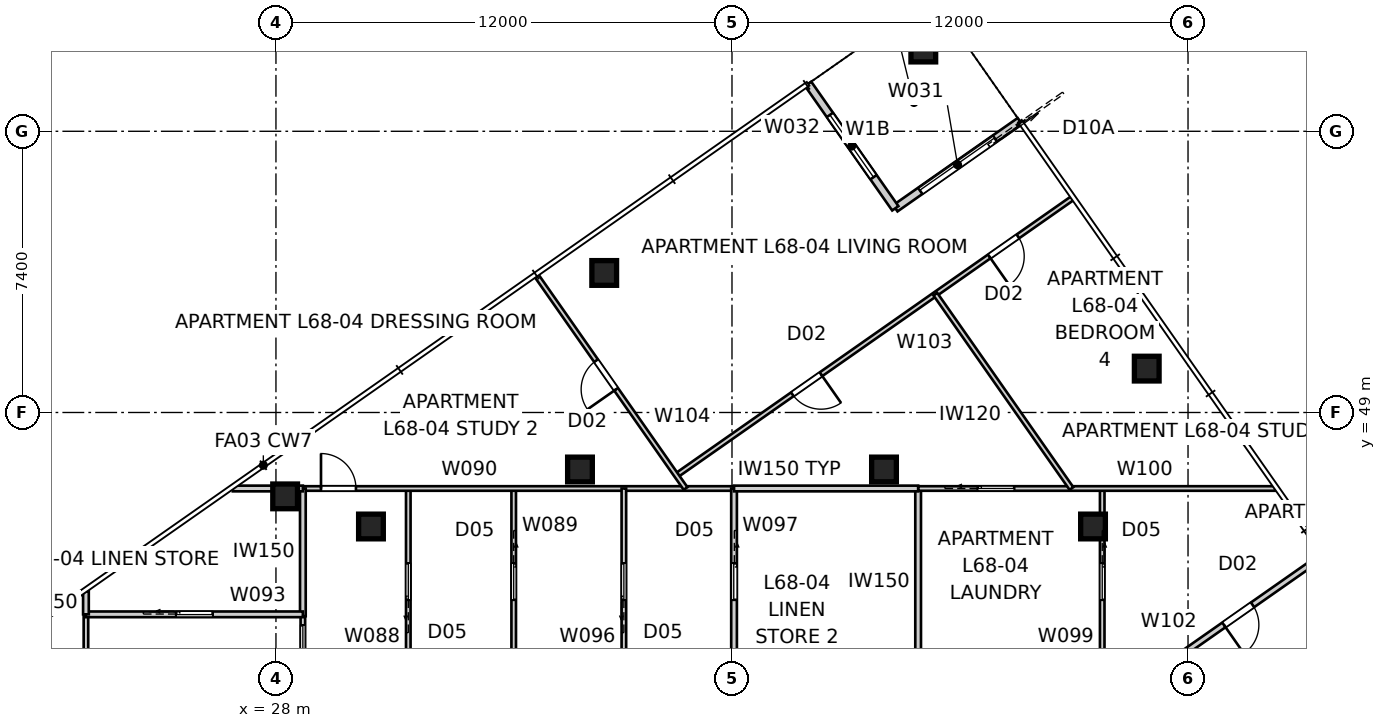
"""IFC4 building model, lengths in metres.
Left out: names, types, materials, properties, quantities, classifications, styles, units other than length and angle.
Written with IfcOpenShell. Run it as: python <this file> out.ifc"""

import sys

from ifc_helpers import new_model, si_unit, direction, frame, frame_2d, origin, origin_2d, place, context, subcontext, project, spatial, rectangle, extrude, element, fill, save


model = new_model("IFC4")
c1 = context("Model", 3, precision=1e-05, world=origin(), true_north=direction((0.0, 1.0)))
c2 = subcontext(c1, "Body", "Model", "MODEL_VIEW")
j1 = project(units=[si_unit("LENGTHUNIT", "METRE"), si_unit("PLANEANGLEUNIT", "RADIAN")], contexts=[c1])
p1 = place(None, origin())
s1 = spatial("IfcSite", under=j1, at=p1, CompositionType="ELEMENT")
p2 = place(p1, origin())
s2 = spatial("IfcBuilding", under=s1, at=p2, CompositionType="ELEMENT")
p3 = place(p2, frame((0.0, 0.0, 247.2)))
s3 = spatial("IfcBuildingStorey", under=s2, at=p3, CompositionType="ELEMENT", Elevation=247.2)
for number, where, z_axis, x_axis in (
    (1, (50.914, 50.155, 0.0), (0.0, 0.0, 1.0), (1.0, 0.0, 0.0)),
    (2, (45.034, 58.551, 0.0), (0.0, 0.0, 1.0), (1.0, 0.0, 0.0)),
    (3, (36.638, 52.672, 0.0), (0.0, 0.0, 1.0), (1.0, 0.0, 0.0)),
    (4, (28.242, 46.793, 0.0), (0.0, 0.0, 1.0), (1.0, 0.0, 0.0)),
    (5, (49.5, 46.0, 0.0), (0.0, 0.0, 1.0), (1.0, 0.0, 0.0)),
    (6, (44.0, 47.5, 0.0), (0.0, 0.0, 1.0), (1.0, 0.0, 0.0)),
    (7, (36.0, 47.5, 0.0), (0.0, 0.0, 1.0), (1.0, 0.0, 0.0)),
    (8, (30.5, 46.0, 0.0), (0.0, 0.0, 1.0), (1.0, 0.0, 0.0)),
):
    element("IfcColumn", number, at=place(p3, frame(where, z_axis=z_axis, x_axis=x_axis)), inside=s3, PredefinedType="COLUMN", context=c2, shape_type="SweptSolid", body=[
        extrude(rectangle(XDim=0.65, YDim=0.65, at=origin_2d()), origin(), (0.0, 0.0, 1.0), 3.4),
    ])
p4 = place(p3, frame((47.574, 56.667, 0.0), z_axis=(0.0, 0.0, 1.0), x_axis=(-0.819165963305, -0.573556557423, 0.0)))
e9 = element("IfcWall", 9, at=p4, inside=s3, PredefinedType="SOLIDWALL", context=c2, shape_type="SweptSolid", body=[
    extrude(rectangle(XDim=4.0, YDim=0.2, at=frame_2d((2.0, 0.0))), origin(), (0.0, 0.0, 1.0), 3.25),
])
p5 = place(p4, frame((0.8, 0.0, 0.0)))
e10 = element("IfcOpeningElement", 10, at=p5, cuts=e9, PredefinedType="OPENING", context=c2, shape_type="SweptSolid", body=[
    extrude(rectangle(XDim=2.4, YDim=2.1, at=frame_2d((1.2, 1.05))), frame((0.0, 0.11, 0.0), z_axis=(0.0, -1.0, 0.0), x_axis=(1.0, 0.0, 0.0)), (0.0, 0.0, 1.0), 0.22),
])
p6 = place(p3, frame((44.298, 54.373, 0.0), z_axis=(0.0, 0.0, 1.0), x_axis=(-0.573597512525, 0.819137286189, 0.0)))
e11 = element("IfcWall", 11, at=p6, inside=s3, PredefinedType="SOLIDWALL", context=c2, shape_type="SweptSolid", body=[
    extrude(rectangle(XDim=4.0, YDim=0.2, at=frame_2d((2.0, 0.0))), origin(), (0.0, 0.0, 1.0), 3.25),
])
p7 = place(p6, frame((1.0, 0.0, 0.45)))
e12 = element("IfcOpeningElement", 12, at=p7, cuts=e11, PredefinedType="OPENING", context=c2, shape_type="SweptSolid", body=[
    extrude(rectangle(XDim=2.0, YDim=1.8, at=frame_2d((1.0, 0.9))), frame((0.0, 0.11, 0.0), z_axis=(0.0, -1.0, 0.0), x_axis=(1.0, 0.0, 0.0)), (0.0, 0.0, 1.0), 0.22),
])
p8 = place(p3, frame((23.0, 16.864, 0.0), z_axis=(0.0, 0.0, 1.0), x_axis=(0.0, 1.0, 0.0)))
e13 = element("IfcWall", 13, at=p8, inside=s3, PredefinedType="PARTITIONING", context=c2, shape_type="SweptSolid", body=[
    extrude(rectangle(XDim=26.824, YDim=0.12, at=frame_2d((13.412, 0.0))), origin(), (0.0, 0.0, 1.0), 2.55),
])
p9 = place(p8, frame((9.599, 0.0, 0.0)))
e14 = element("IfcOpeningElement", 14, at=p9, cuts=e13, PredefinedType="OPENING", context=c2, shape_type="SweptSolid", body=[
    extrude(rectangle(XDim=0.92, YDim=2.34, at=frame_2d((0.46, 1.17))), frame((0.0, 0.07, 0.0), z_axis=(0.0, -1.0, 0.0), x_axis=(1.0, 0.0, 0.0)), (0.0, 0.0, 1.0), 0.14),
])
p10 = place(p8, frame((17.603, 0.0, 0.0)))
e15 = element("IfcOpeningElement", 15, at=p10, cuts=e13, PredefinedType="OPENING", context=c2, shape_type="SweptSolid", body=[
    extrude(rectangle(XDim=0.92, YDim=2.34, at=frame_2d((0.46, 1.17))), frame((0.0, 0.07, 0.0), z_axis=(0.0, -1.0, 0.0), x_axis=(1.0, 0.0, 0.0)), (0.0, 0.0, 1.0), 0.14),
])
p11 = place(p8, frame((12.806, 0.0, 0.0)))
e16 = element("IfcOpeningElement", 16, at=p11, cuts=e13, PredefinedType="OPENING", context=c2, shape_type="SweptSolid", body=[
    extrude(rectangle(XDim=0.92, YDim=2.34, at=frame_2d((0.46, 1.17))), frame((0.0, 0.07, 0.0), z_axis=(0.0, -1.0, 0.0), x_axis=(1.0, 0.0, 0.0)), (0.0, 0.0, 1.0), 0.14),
])
p12 = place(p3, frame((31.482, 42.1, 0.0), z_axis=(0.0, 0.0, 1.0), x_axis=(0.0, 1.0, 0.0)))
e17 = element("IfcWall", 17, at=p12, inside=s3, PredefinedType="PARTITIONING", context=c2, shape_type="SweptSolid", body=[
    extrude(rectangle(XDim=4.9, YDim=0.12, at=frame_2d((2.45, 0.0))), origin(), (0.0, 0.0, 1.0), 3.25),
])
p13 = place(p12, frame((1.97, 0.0, 0.0)))
e18 = element("IfcOpeningElement", 18, at=p13, cuts=e17, PredefinedType="OPENING", context=c2, shape_type="SweptSolid", body=[
    extrude(rectangle(XDim=0.96, YDim=2.1, at=frame_2d((0.48, 1.05))), frame((0.0, 0.07, 0.0), z_axis=(0.0, -1.0, 0.0), x_axis=(1.0, 0.0, 0.0)), (0.0, 0.0, 1.0), 0.14),
])
p14 = place(p3, frame((34.256, 47.0, 0.0), z_axis=(0.0, 0.0, 1.0), x_axis=(0.0, -1.0, 0.0)))
e19 = element("IfcWall", 19, at=p14, inside=s3, PredefinedType="PARTITIONING", context=c2, shape_type="SweptSolid", body=[
    extrude(rectangle(XDim=4.9, YDim=0.12, at=frame_2d((2.45, 0.0))), origin(), (0.0, 0.0, 1.0), 2.796),
])
p15 = place(p14, frame((1.97, 0.0, 0.0)))
e20 = element("IfcOpeningElement", 20, at=p15, cuts=e19, PredefinedType="OPENING", context=c2, shape_type="SweptSolid", body=[
    extrude(rectangle(XDim=0.96, YDim=2.1, at=frame_2d((0.48, 1.05))), frame((0.0, 0.07, 0.0), z_axis=(0.0, -1.0, 0.0), x_axis=(1.0, 0.0, 0.0)), (0.0, 0.0, 1.0), 0.14),
])
p16 = place(p3, frame((28.708, 47.0, 0.0), z_axis=(0.0, 0.0, 1.0), x_axis=(1.0, 0.0, 0.0)))
e21 = element("IfcWall", 21, at=p16, inside=s3, PredefinedType="PARTITIONING", context=c2, shape_type="SweptSolid", body=[
    extrude(rectangle(XDim=11.346, YDim=0.12, at=frame_2d((5.673, 0.0))), origin(), (0.0, 0.0, 1.0), 2.55),
])
p17 = place(p16, frame((0.477, 0.0, 0.0)))
e22 = element("IfcOpeningElement", 22, at=p17, cuts=e21, PredefinedType="OPENING", context=c2, shape_type="SweptSolid", body=[
    extrude(rectangle(XDim=0.92, YDim=2.34, at=frame_2d((0.46, 1.17))), frame((0.0, 0.07, 0.0), z_axis=(0.0, -1.0, 0.0), x_axis=(1.0, 0.0, 0.0)), (0.0, 0.0, 1.0), 0.14),
])
p18 = place(p3, frame((28.708, 41.18, 0.0), z_axis=(0.0, 0.0, 1.0), x_axis=(0.0, 1.0, 0.0)))
e23 = element("IfcWall", 23, at=p18, inside=s3, PredefinedType="PARTITIONING", context=c2, shape_type="SweptSolid", body=[
    extrude(rectangle(XDim=2.458, YDim=0.12, at=frame_2d((1.229, 0.0))), origin(), (0.0, 0.0, 1.0), 3.25),
])
p19 = place(p18, frame((1.259, 0.0, 0.0)))
e24 = element("IfcOpeningElement", 24, at=p19, cuts=e23, PredefinedType="OPENING", context=c2, shape_type="SweptSolid", body=[
    extrude(rectangle(XDim=0.96, YDim=2.1, at=frame_2d((0.48, 1.05))), frame((0.0, 0.07, 0.0), z_axis=(0.0, -1.0, 0.0), x_axis=(1.0, 0.0, 0.0)), (0.0, 0.0, 1.0), 0.14),
])
p20 = place(p3, frame((28.708, 43.638, 0.0), z_axis=(0.0, 0.0, 1.0), x_axis=(0.0, 1.0, 0.0)))
e25 = element("IfcWall", 25, at=p20, inside=s3, PredefinedType="SOLIDWALL", context=c2, shape_type="SweptSolid", body=[
    extrude(rectangle(XDim=3.362, YDim=0.15, at=frame_2d((1.681, 0.0))), origin(), (0.0, 0.0, 1.0), 3.25),
])
p21 = place(p3, frame((23.0, 43.688, 0.0), z_axis=(0.0, 0.0, 1.0), x_axis=(1.0, 0.0, 0.0)))
e26 = element("IfcWall", 26, at=p21, inside=s3, PredefinedType="SOLIDWALL", context=c2, shape_type="SweptSolid", body=[
    extrude(rectangle(XDim=5.708, YDim=0.15, at=frame_2d((2.854, 0.0))), origin(), (0.0, 0.0, 1.0), 3.25),
])
p22 = place(p21, frame((2.374, 0.0, 0.0)))
e27 = element("IfcOpeningElement", 27, at=p22, cuts=e26, PredefinedType="OPENING", context=c2, shape_type="SweptSolid", body=[
    extrude(rectangle(XDim=0.96, YDim=2.1, at=frame_2d((0.48, 1.05))), frame((0.0, 0.085, 0.0), z_axis=(0.0, -1.0, 0.0), x_axis=(1.0, 0.0, 0.0)), (0.0, 0.0, 1.0), 0.17),
])
p23 = place(p3, frame((23.0, 43.688, 0.0), z_axis=(0.0, 0.0, 1.0), x_axis=(0.0, 1.0, 0.0)))
e28 = element("IfcWall", 28, at=p23, inside=s3, PredefinedType="SOLIDWALL", context=c2, shape_type="SweptSolid", body=[
    extrude(rectangle(XDim=0.606, YDim=0.15, at=frame_2d((0.303, 0.0))), origin(), (0.0, 0.0, 1.0), 3.25),
])
p24 = place(p3, frame((26.864, 47.0, 0.0), z_axis=(0.0, 0.0, 1.0), x_axis=(1.0, 0.0, 0.0)))
e29 = element("IfcWall", 29, at=p24, inside=s3, PredefinedType="SOLIDWALL", context=c2, shape_type="SweptSolid", body=[
    extrude(rectangle(XDim=1.844, YDim=0.15, at=frame_2d((0.922, 0.0))), origin(), (0.0, 0.0, 1.0), 3.25),
])
p25 = place(p3, frame((37.155, 42.1, 0.0), z_axis=(0.0, 0.0, 1.0), x_axis=(0.0, 1.0, 0.0)))
e30 = element("IfcWall", 30, at=p25, inside=s3, PredefinedType="PARTITIONING", context=c2, shape_type="SweptSolid", body=[
    extrude(rectangle(XDim=4.9, YDim=0.12, at=frame_2d((2.45, 0.0))), origin(), (0.0, 0.0, 1.0), 2.796),
])
p26 = place(p25, frame((1.97, 0.0, 0.0)))
e31 = element("IfcOpeningElement", 31, at=p26, cuts=e30, PredefinedType="OPENING", context=c2, shape_type="SweptSolid", body=[
    extrude(rectangle(XDim=0.96, YDim=2.1, at=frame_2d((0.48, 1.05))), frame((0.0, 0.07, 0.0), z_axis=(0.0, -1.0, 0.0), x_axis=(1.0, 0.0, 0.0)), (0.0, 0.0, 1.0), 0.14),
])
p27 = place(p3, frame((40.054, 47.0, 0.0), z_axis=(0.0, 0.0, 1.0), x_axis=(0.0, -1.0, 0.0)))
e32 = element("IfcWall", 32, at=p27, inside=s3, PredefinedType="SOLIDWALL", context=c2, shape_type="SweptSolid", body=[
    extrude(rectangle(XDim=4.9, YDim=0.15, at=frame_2d((2.45, 0.0))), origin(), (0.0, 0.0, 1.0), 2.796),
])
p28 = place(p27, frame((1.97, 0.0, 0.0)))
e33 = element("IfcOpeningElement", 33, at=p28, cuts=e32, PredefinedType="OPENING", context=c2, shape_type="SweptSolid", body=[
    extrude(rectangle(XDim=0.96, YDim=2.1, at=frame_2d((0.48, 1.05))), frame((0.0, 0.085, 0.0), z_axis=(0.0, -1.0, 0.0), x_axis=(1.0, 0.0, 0.0)), (0.0, 0.0, 1.0), 0.17),
])
p29 = place(p3, frame((44.898, 42.1, 0.0), z_axis=(0.0, 0.0, 1.0), x_axis=(0.0, 1.0, 0.0)))
e34 = element("IfcWall", 34, at=p29, inside=s3, PredefinedType="SOLIDWALL", context=c2, shape_type="SweptSolid", body=[
    extrude(rectangle(XDim=4.9, YDim=0.15, at=frame_2d((2.45, 0.0))), origin(), (0.0, 0.0, 1.0), 3.25),
])
p30 = place(p3, frame((49.742, 47.0, 0.0), z_axis=(0.0, 0.0, 1.0), x_axis=(0.0, -1.0, 0.0)))
e35 = element("IfcWall", 35, at=p30, inside=s3, PredefinedType="PARTITIONING", context=c2, shape_type="SweptSolid", body=[
    extrude(rectangle(XDim=4.9, YDim=0.12, at=frame_2d((2.45, 0.0))), origin(), (0.0, 0.0, 1.0), 3.25),
])
p31 = place(p30, frame((1.97, 0.0, 0.0)))
e36 = element("IfcOpeningElement", 36, at=p31, cuts=e35, PredefinedType="OPENING", context=c2, shape_type="SweptSolid", body=[
    extrude(rectangle(XDim=0.96, YDim=2.1, at=frame_2d((0.48, 1.05))), frame((0.0, 0.07, 0.0), z_axis=(0.0, -1.0, 0.0), x_axis=(1.0, 0.0, 0.0)), (0.0, 0.0, 1.0), 0.14),
])
p32 = place(p3, frame((44.898, 47.0, 0.0), z_axis=(0.0, 0.0, 1.0), x_axis=(1.0, 0.0, 0.0)))
e37 = element("IfcWall", 37, at=p32, inside=s3, PredefinedType="PARTITIONING", context=c2, shape_type="SweptSolid", body=[
    extrude(rectangle(XDim=9.396, YDim=0.12, at=frame_2d((4.698, 0.0))), origin(), (0.0, 0.0, 1.0), 2.55),
])
p33 = place(p32, frame((1.568, 0.0, 0.0)))
e38 = element("IfcOpeningElement", 38, at=p33, cuts=e37, PredefinedType="OPENING", context=c2, shape_type="SweptSolid", body=[
    extrude(rectangle(XDim=0.96, YDim=2.1, at=frame_2d((0.48, 1.05))), frame((0.0, 0.07, 0.0), z_axis=(0.0, -1.0, 0.0), x_axis=(1.0, 0.0, 0.0)), (0.0, 0.0, 1.0), 0.14),
])
p34 = place(p3, frame((40.054, 47.0, 0.0), z_axis=(0.0, 0.0, 1.0), x_axis=(1.0, 0.0, 0.0)))
e39 = element("IfcWall", 39, at=p34, inside=s3, PredefinedType="SOLIDWALL", context=c2, shape_type="SweptSolid", body=[
    extrude(rectangle(XDim=4.844, YDim=0.15, at=frame_2d((2.422, 0.0))), origin(), (0.0, 0.0, 1.0), 3.25),
])
p35 = place(p3, frame((55.537, 45.226, 0.0), z_axis=(0.0, 0.0, 1.0), x_axis=(-0.819158250207, -0.573567573279, 0.0)))
e40 = element("IfcWall", 40, at=p35, inside=s3, PredefinedType="SOLIDWALL", context=c2, shape_type="SweptSolid", body=[
    extrude(rectangle(XDim=5.45, YDim=0.15, at=frame_2d((2.725, 0.0))), origin(), (0.0, 0.0, 1.0), 3.25),
])
p36 = place(p35, frame((2.245, 0.0, 0.0)))
e41 = element("IfcOpeningElement", 41, at=p36, cuts=e40, PredefinedType="OPENING", context=c2, shape_type="SweptSolid", body=[
    extrude(rectangle(XDim=0.92, YDim=2.34, at=frame_2d((0.46, 1.17))), frame((0.0, 0.085, 0.0), z_axis=(0.0, -1.0, 0.0), x_axis=(1.0, 0.0, 0.0)), (0.0, 0.0, 1.0), 0.17),
])
p37 = place(p3, frame((48.949, 54.633, 0.0), z_axis=(0.0, 0.0, 1.0), x_axis=(-0.819155207289, -0.573571919092, 0.0)))
e42 = element("IfcWall", 42, at=p37, inside=s3, PredefinedType="PARTITIONING", context=c2, shape_type="SweptSolid", body=[
    extrude(rectangle(XDim=12.71, YDim=0.12, at=frame_2d((6.355, 0.0))), origin(), (0.0, 0.0, 1.0), 3.25),
])
p38 = place(p37, frame((8.066, 0.0, 0.0)))
e43 = element("IfcOpeningElement", 43, at=p38, cuts=e42, PredefinedType="OPENING", context=c2, shape_type="SweptSolid", body=[
    extrude(rectangle(XDim=0.92, YDim=2.34, at=frame_2d((0.46, 1.17))), frame((0.0, 0.07, 0.0), z_axis=(0.0, -1.0, 0.0), x_axis=(1.0, 0.0, 0.0)), (0.0, 0.0, 1.0), 0.14),
])
p39 = place(p37, frame((1.741, 0.0, 0.0)))
e44 = element("IfcOpeningElement", 44, at=p39, cuts=e42, PredefinedType="OPENING", context=c2, shape_type="SweptSolid", body=[
    extrude(rectangle(XDim=0.92, YDim=2.34, at=frame_2d((0.46, 1.17))), frame((0.0, 0.07, 0.0), z_axis=(0.0, -1.0, 0.0), x_axis=(1.0, 0.0, 0.0)), (0.0, 0.0, 1.0), 0.14),
])
p40 = place(p3, frame((38.778, 47.0, 0.0), z_axis=(0.0, 0.0, 1.0), x_axis=(-0.57357503053, 0.819153028653, 0.0)))
e45 = element("IfcWall", 45, at=p40, inside=s3, PredefinedType="PARTITIONING", context=c2, shape_type="SweptSolid", body=[
    extrude(rectangle(XDim=6.834, YDim=0.12, at=frame_2d((3.417, 0.0))), origin(), (0.0, 0.0, 1.0), 3.25),
])
p41 = place(p40, frame((3.186, 0.0, 0.0)))
e46 = element("IfcOpeningElement", 46, at=p41, cuts=e45, PredefinedType="OPENING", context=c2, shape_type="SweptSolid", body=[
    extrude(rectangle(XDim=0.92, YDim=2.34, at=frame_2d((0.46, 1.17))), frame((0.0, 0.07, 0.0), z_axis=(0.0, -1.0, 0.0), x_axis=(1.0, 0.0, 0.0)), (0.0, 0.0, 1.0), 0.14),
])
p42 = place(p3, frame((48.932, 47.0, 0.0), z_axis=(0.0, 0.0, 1.0), x_axis=(-0.573569946952, 0.819156588177, 0.0)))
e47 = element("IfcWall", 47, at=p42, inside=s3, PredefinedType="PARTITIONING", context=c2, shape_type="SweptSolid", body=[
    extrude(rectangle(XDim=6.243, YDim=0.12, at=frame_2d((3.122, 0.0))), origin(), (0.0, 0.0, 1.0), 3.25),
])
p43 = place(p5, origin())
e48 = element("IfcDoor", 48, at=p43, inside=s3, OperationType="SLIDING_TO_LEFT", PredefinedType="DOOR", context=c2, shape_type="SweptSolid", body=[
    extrude(rectangle(XDim=2.4, YDim=2.1, at=frame_2d((1.2, 1.05))), frame((0.0, 0.025, 0.0), z_axis=(0.0, -1.0, 0.0), x_axis=(1.0, 0.0, 0.0)), (0.0, 0.0, 1.0), 0.05),
])
fill(e10, e48)
p44 = place(p7, origin())
e49 = element("IfcWindow", 49, at=p44, inside=s3, PartitioningType="SINGLE_PANEL", PredefinedType="WINDOW", context=c2, shape_type="SweptSolid", body=[
    extrude(rectangle(XDim=2.0, YDim=1.8, at=frame_2d((1.0, 0.9))), frame((0.0, 0.03, 0.0), z_axis=(0.0, -1.0, 0.0), x_axis=(1.0, 0.0, 0.0)), (0.0, 0.0, 1.0), 0.06),
])
fill(e12, e49)
p45 = place(p22, origin())
e50 = element("IfcDoor", 50, at=p45, inside=s3, OperationType="SLIDING_TO_LEFT", PredefinedType="DOOR", context=c2, shape_type="SweptSolid", body=[
    extrude(rectangle(XDim=0.96, YDim=2.1, at=frame_2d((0.48, 1.05))), frame((0.0, 0.025, 0.0), z_axis=(0.0, -1.0, 0.0), x_axis=(1.0, 0.0, 0.0)), (0.0, 0.0, 1.0), 0.05),
])
fill(e27, e50)
p46 = place(p19, origin())
e51 = element("IfcDoor", 51, at=p46, inside=s3, OperationType="SLIDING_TO_LEFT", PredefinedType="DOOR", context=c2, shape_type="SweptSolid", body=[
    extrude(rectangle(XDim=0.96, YDim=2.1, at=frame_2d((0.48, 1.05))), frame((0.0, 0.025, 0.0), z_axis=(0.0, -1.0, 0.0), x_axis=(1.0, 0.0, 0.0)), (0.0, 0.0, 1.0), 0.05),
])
fill(e24, e51)
p47 = place(p13, origin())
e52 = element("IfcDoor", 52, at=p47, inside=s3, OperationType="SLIDING_TO_LEFT", PredefinedType="DOOR", context=c2, shape_type="SweptSolid", body=[
    extrude(rectangle(XDim=0.96, YDim=2.1, at=frame_2d((0.48, 1.05))), frame((0.0, 0.025, 0.0), z_axis=(0.0, -1.0, 0.0), x_axis=(1.0, 0.0, 0.0)), (0.0, 0.0, 1.0), 0.05),
])
fill(e18, e52)
p48 = place(p17, origin())
e53 = element("IfcDoor", 53, at=p48, inside=s3, OperationType="SINGLE_SWING_LEFT", PredefinedType="DOOR", context=c2, shape_type="SweptSolid", body=[
    extrude(rectangle(XDim=0.92, YDim=2.34, at=frame_2d((0.46, 1.17))), frame((0.0, 0.025, 0.0), z_axis=(0.0, -1.0, 0.0), x_axis=(1.0, 0.0, 0.0)), (0.0, 0.0, 1.0), 0.05),
])
fill(e22, e53)
p49 = place(p15, origin())
e54 = element("IfcDoor", 54, at=p49, inside=s3, OperationType="SLIDING_TO_LEFT", PredefinedType="DOOR", context=c2, shape_type="SweptSolid", body=[
    extrude(rectangle(XDim=0.96, YDim=2.1, at=frame_2d((0.48, 1.05))), frame((0.0, 0.025, 0.0), z_axis=(0.0, -1.0, 0.0), x_axis=(1.0, 0.0, 0.0)), (0.0, 0.0, 1.0), 0.05),
])
fill(e20, e54)
p50 = place(p41, origin())
e55 = element("IfcDoor", 55, at=p50, inside=s3, OperationType="SINGLE_SWING_LEFT", PredefinedType="DOOR", context=c2, shape_type="SweptSolid", body=[
    extrude(rectangle(XDim=0.92, YDim=2.34, at=frame_2d((0.46, 1.17))), frame((0.0, 0.025, 0.0), z_axis=(0.0, -1.0, 0.0), x_axis=(1.0, 0.0, 0.0)), (0.0, 0.0, 1.0), 0.05),
])
fill(e46, e55)
p51 = place(p26, origin())
e56 = element("IfcDoor", 56, at=p51, inside=s3, OperationType="SLIDING_TO_LEFT", PredefinedType="DOOR", context=c2, shape_type="SweptSolid", body=[
    extrude(rectangle(XDim=0.96, YDim=2.1, at=frame_2d((0.48, 1.05))), frame((0.0, 0.025, 0.0), z_axis=(0.0, -1.0, 0.0), x_axis=(1.0, 0.0, 0.0)), (0.0, 0.0, 1.0), 0.05),
])
fill(e31, e56)
p52 = place(p38, origin())
e57 = element("IfcDoor", 57, at=p52, inside=s3, OperationType="SINGLE_SWING_LEFT", PredefinedType="DOOR", context=c2, shape_type="SweptSolid", body=[
    extrude(rectangle(XDim=0.92, YDim=2.34, at=frame_2d((0.46, 1.17))), frame((0.0, 0.025, 0.0), z_axis=(0.0, -1.0, 0.0), x_axis=(1.0, 0.0, 0.0)), (0.0, 0.0, 1.0), 0.05),
])
fill(e43, e57)
p53 = place(p39, origin())
e58 = element("IfcDoor", 58, at=p53, inside=s3, OperationType="SINGLE_SWING_RIGHT", PredefinedType="DOOR", context=c2, shape_type="SweptSolid", body=[
    extrude(rectangle(XDim=0.92, YDim=2.34, at=frame_2d((0.46, 1.17))), frame((0.0, 0.025, 0.0), z_axis=(0.0, -1.0, 0.0), x_axis=(1.0, 0.0, 0.0)), (0.0, 0.0, 1.0), 0.05),
])
fill(e44, e58)
p54 = place(p28, origin())
e59 = element("IfcDoor", 59, at=p54, inside=s3, OperationType="SLIDING_TO_LEFT", PredefinedType="DOOR", context=c2, shape_type="SweptSolid", body=[
    extrude(rectangle(XDim=0.96, YDim=2.1, at=frame_2d((0.48, 1.05))), frame((0.0, 0.025, 0.0), z_axis=(0.0, -1.0, 0.0), x_axis=(1.0, 0.0, 0.0)), (0.0, 0.0, 1.0), 0.05),
])
fill(e33, e59)
p55 = place(p33, origin())
e60 = element("IfcDoor", 60, at=p55, inside=s3, OperationType="SLIDING_TO_LEFT", PredefinedType="DOOR", context=c2, shape_type="SweptSolid", body=[
    extrude(rectangle(XDim=0.96, YDim=2.1, at=frame_2d((0.48, 1.05))), frame((0.0, 0.025, 0.0), z_axis=(0.0, -1.0, 0.0), x_axis=(1.0, 0.0, 0.0)), (0.0, 0.0, 1.0), 0.05),
])
fill(e38, e60)
p56 = place(p31, origin())
e61 = element("IfcDoor", 61, at=p56, inside=s3, OperationType="SLIDING_TO_LEFT", PredefinedType="DOOR", context=c2, shape_type="SweptSolid", body=[
    extrude(rectangle(XDim=0.96, YDim=2.1, at=frame_2d((0.48, 1.05))), frame((0.0, 0.025, 0.0), z_axis=(0.0, -1.0, 0.0), x_axis=(1.0, 0.0, 0.0)), (0.0, 0.0, 1.0), 0.05),
])
fill(e36, e61)
p57 = place(p36, origin())
e62 = element("IfcDoor", 62, at=p57, inside=s3, OperationType="SINGLE_SWING_RIGHT", PredefinedType="DOOR", context=c2, shape_type="SweptSolid", body=[
    extrude(rectangle(XDim=0.92, YDim=2.34, at=frame_2d((0.46, 1.17))), frame((0.0, 0.025, 0.0), z_axis=(0.0, -1.0, 0.0), x_axis=(1.0, 0.0, 0.0)), (0.0, 0.0, 1.0), 0.05),
])
fill(e41, e62)
save(model, sys.argv[1])
